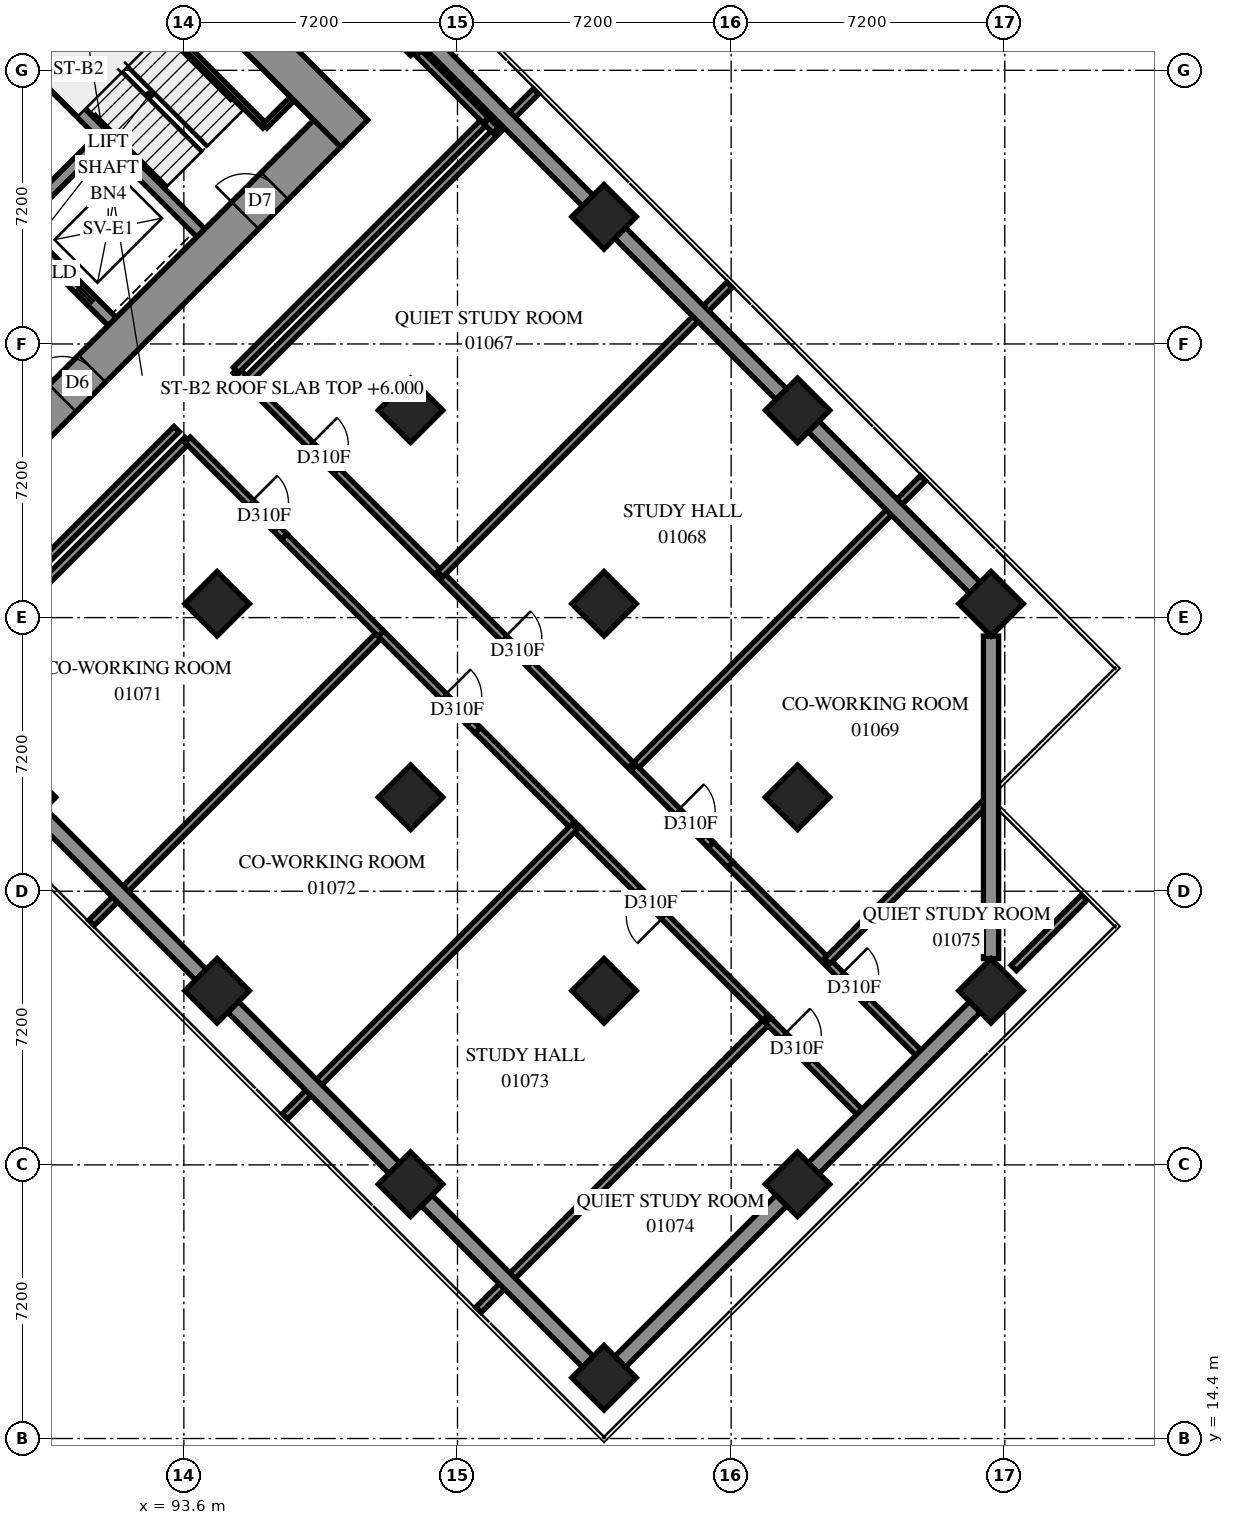
"""IFC4 building model, lengths in metres.
Left out: names, types, materials, properties, quantities, classifications, styles, units other than length and angle.
Written with IfcOpenShell. Run it as: python <this file> out.ifc"""

import sys

from ifc_helpers import new_model, si_unit, direction, frame, frame_2d, origin, origin_2d, place, context, subcontext, project, spatial, rectangle, extrude, element, fill, save


model = new_model("IFC4")
c1 = context("Model", 3, precision=1e-05, world=origin(), true_north=direction((0.0, 1.0)))
c2 = subcontext(c1, "Body", "Model", "MODEL_VIEW")
j1 = project(units=[si_unit("LENGTHUNIT", "METRE"), si_unit("PLANEANGLEUNIT", "RADIAN")], contexts=[c1])
p1 = place(None, origin())
s1 = spatial("IfcSite", under=j1, at=p1, CompositionType="ELEMENT")
p2 = place(p1, origin())
s2 = spatial("IfcBuilding", under=s1, at=p2, CompositionType="ELEMENT")
p3 = place(p2, frame((0.0, 0.0, 6.0)))
s3 = spatial("IfcBuildingStorey", under=s2, at=p3, CompositionType="ELEMENT", Elevation=6.0)
for number, where, z_axis, x_axis in (
    (1, (99.565, 51.635, 0.0), (0.0, 0.0, 1.0), (0.707, -0.707, 0.0)),
    (2, (104.656, 46.544, 0.0), (0.0, 0.0, 1.0), (0.707, -0.707, 0.0)),
    (3, (99.565, 41.453, 0.0), (0.0, 0.0, 1.0), (0.707, -0.707, 0.0)),
    (4, (94.474, 36.362, 0.0), (0.0, 0.0, 1.0), (0.707, -0.707, 0.0)),
    (5, (89.382, 31.271, 0.0), (0.0, 0.0, 1.0), (0.707, -0.707, 0.0)),
    (6, (109.747, 41.453, 0.0), (0.0, 0.0, 1.0), (0.707, -0.707, 0.0)),
    (7, (104.656, 36.362, 0.0), (0.0, 0.0, 1.0), (0.707, -0.707, 0.0)),
    (8, (99.565, 31.271, 0.0), (0.0, 0.0, 1.0), (0.707, -0.707, 0.0)),
    (9, (94.474, 26.18, 0.0), (0.0, 0.0, 1.0), (0.707, -0.707, 0.0)),
    (10, (114.838, 36.362, 0.0), (0.0, 0.0, 1.0), (0.707, -0.707, 0.0)),
    (11, (109.747, 31.271, 0.0), (0.0, 0.0, 1.0), (0.707, -0.707, 0.0)),
    (12, (104.656, 26.18, 0.0), (0.0, 0.0, 1.0), (0.707, -0.707, 0.0)),
    (13, (99.565, 21.088, 0.0), (0.0, 0.0, 1.0), (0.707, -0.707, 0.0)),
    (14, (114.838, 26.18, 0.0), (0.0, 0.0, 1.0), (0.707, -0.707, 0.0)),
    (15, (109.747, 21.088, 0.0), (0.0, 0.0, 1.0), (0.707, -0.707, 0.0)),
    (16, (104.656, 15.997, 0.0), (0.0, 0.0, 1.0), (0.707, -0.707, 0.0)),
):
    element("IfcColumn", number, at=place(p3, frame(where, z_axis=z_axis, x_axis=x_axis)), inside=s3, PredefinedType="COLUMN", context=c2, shape_type="SweptSolid", body=[
        extrude(rectangle(XDim=1.2, YDim=1.2, at=origin_2d()), origin(), (0.0, 0.0, 1.0), 3.8),
    ])
p4 = place(p3, frame((86.483, 60.333, -0.4), z_axis=(0.0, 0.0, 1.0), x_axis=(0.70710983, -0.7071037324, 0.0)))
e17 = element("IfcWall", 17, at=p4, inside=s3, PredefinedType="SHEAR", context=c2, shape_type="SweptSolid", body=[
    extrude(rectangle(XDim=16.4, YDim=1.0, at=frame_2d((8.2, 0.0))), origin(), (0.0, 0.0, 1.0), 3.5),
])
p5 = place(p4, frame((11.0, 0.0, 0.4)))
e18 = element("IfcOpeningElement", 18, at=p5, cuts=e17, PredefinedType="OPENING", context=c2, shape_type="SweptSolid", body=[
    extrude(rectangle(XDim=0.8, YDim=2.1, at=frame_2d((0.4, 1.05))), frame((0.0, 0.51, 0.0), z_axis=(0.0, -1.0, 0.0), x_axis=(1.0, 0.0, 0.0)), (0.0, 0.0, 1.0), 1.02),
])
p6 = place(p3, frame((87.19, 38.554, -0.4), z_axis=(0.0, 0.0, 1.0), x_axis=(0.707103309, 0.7071102534, 0.0)))
e19 = element("IfcWall", 19, at=p6, inside=s3, PredefinedType="SHEAR", context=c2, shape_type="SweptSolid", body=[
    extrude(rectangle(XDim=14.4, YDim=1.0, at=frame_2d((7.2, 0.0))), origin(), (0.0, 0.0, 1.0), 3.5),
])
p7 = place(p6, frame((4.55, 0.0, 0.4)))
e20 = element("IfcOpeningElement", 20, at=p7, cuts=e19, PredefinedType="OPENING", context=c2, shape_type="SweptSolid", body=[
    extrude(rectangle(XDim=1.1, YDim=2.1, at=frame_2d((0.55, 1.05))), frame((0.0, 0.51, 0.0), z_axis=(0.0, -1.0, 0.0), x_axis=(1.0, 0.0, 0.0)), (0.0, 0.0, 1.0), 1.02),
])
p8 = place(p6, frame((11.35, 0.0, 0.4)))
e21 = element("IfcOpeningElement", 21, at=p8, cuts=e19, PredefinedType="OPENING", context=c2, shape_type="SweptSolid", body=[
    extrude(rectangle(XDim=1.1, YDim=2.1, at=frame_2d((0.55, 1.05))), frame((0.0, 0.51, 0.0), z_axis=(0.0, -1.0, 0.0), x_axis=(1.0, 0.0, 0.0)), (0.0, 0.0, 1.0), 1.02),
])
p9 = place(p3, frame((89.17, 46.332, 0.0), z_axis=(0.0, 0.0, 1.0), x_axis=(0.7071067812, 0.7071067812, 0.0)))
e22 = element("IfcWall", 22, at=p9, inside=s3, PredefinedType="SOLIDWALL", context=c2, shape_type="SweptSolid", body=[
    extrude(rectangle(XDim=3.3, YDim=0.3, at=frame_2d((1.65, 0.0))), origin(), (0.0, 0.0, 1.0), 3.8),
])
p10 = place(p3, frame((81.534, 53.969, 0.0), z_axis=(0.0, 0.0, 1.0), x_axis=(0.707103309, -0.7071102534, 0.0)))
e23 = element("IfcWall", 23, at=p10, inside=s3, PredefinedType="SOLIDWALL", context=c2, shape_type="SweptSolid", body=[
    extrude(rectangle(XDim=14.4, YDim=0.3, at=frame_2d((7.2, 0.0))), origin(), (0.0, 0.0, 1.0), 3.8),
])
p11 = place(p10, frame((12.05, 0.0, 0.0)))
e24 = element("IfcOpeningElement", 24, at=p11, cuts=e23, PredefinedType="OPENING", context=c2, shape_type="SweptSolid", body=[
    extrude(rectangle(XDim=1.1, YDim=2.1, at=frame_2d((0.55, 1.05))), frame((0.0, 0.16, 0.0), z_axis=(0.0, -1.0, 0.0), x_axis=(1.0, 0.0, 0.0)), (0.0, 0.0, 1.0), 0.32),
])
p12 = place(p3, frame((88.958, 51.211, 0.0), z_axis=(0.0, 0.0, 1.0), x_axis=(0.7070998367, -0.7071137256, 0.0)))
e25 = element("IfcWall", 25, at=p12, inside=s3, PredefinedType="SOLIDWALL", context=c2, shape_type="SweptSolid", body=[
    extrude(rectangle(XDim=7.2, YDim=0.3, at=frame_2d((3.6, 0.0))), origin(), (0.0, 0.0, 1.0), 3.8),
])
p13 = place(p3, frame((91.313, 53.354, 0.0), z_axis=(0.0, 0.0, 1.0), x_axis=(0.7071147811, -0.7070987812, 0.0)))
e26 = element("IfcWall", 26, at=p13, inside=s3, PredefinedType="PARTITIONING", context=c2, shape_type="SweptSolid", body=[
    extrude(rectangle(XDim=6.25, YDim=0.15, at=frame_2d((3.125, 0.0))), origin(), (0.0, 0.0, 1.0), 3.8),
])
p14 = place(p3, frame((95.732, 48.934, 0.0), z_axis=(0.0, 0.0, 1.0), x_axis=(0.7071067812, 0.7071067812, 0.0)))
e27 = element("IfcWall", 27, at=p14, inside=s3, PredefinedType="PARTITIONING", context=c2, shape_type="SweptSolid", body=[
    extrude(rectangle(XDim=1.02, YDim=0.15, at=frame_2d((0.51, 0.0))), origin(), (0.0, 0.0, 1.0), 3.8),
])
p15 = place(p3, frame((94.967, 42.509, 0.0), z_axis=(0.0, 0.0, 1.0), x_axis=(0.7071067812, -0.7071067812, 0.0)))
e28 = element("IfcWall", 28, at=p15, inside=s3, PredefinedType="PARTITIONING", context=c2, shape_type="SweptSolid", body=[
    extrude(rectangle(XDim=14.798, YDim=0.2, at=frame_2d((7.399, 0.0))), origin(), (0.0, 0.0, 1.0), 3.8),
])
p16 = place(p15, frame((2.772, 0.0, 0.0)))
e29 = element("IfcOpeningElement", 29, at=p16, cuts=e28, PredefinedType="OPENING", context=c2, shape_type="SweptSolid", body=[
    extrude(rectangle(XDim=1.0, YDim=2.1, at=frame_2d((0.5, 1.05))), frame((0.0, 0.11, 0.0), z_axis=(0.0, -1.0, 0.0), x_axis=(1.0, 0.0, 0.0)), (0.0, 0.0, 1.0), 0.22),
])
p17 = place(p15, frame((9.972, 0.0, 0.0)))
e30 = element("IfcOpeningElement", 30, at=p17, cuts=e28, PredefinedType="OPENING", context=c2, shape_type="SweptSolid", body=[
    extrude(rectangle(XDim=1.0, YDim=2.1, at=frame_2d((0.5, 1.05))), frame((0.0, 0.11, 0.0), z_axis=(0.0, -1.0, 0.0), x_axis=(1.0, 0.0, 0.0)), (0.0, 0.0, 1.0), 0.22),
])
p18 = place(p3, frame((108.973, 25.405, 0.0), z_axis=(0.0, 0.0, 1.0), x_axis=(-0.7072456519, 0.7069678831, 0.0)))
e31 = element("IfcWall", 31, at=p18, inside=s3, PredefinedType="PARTITIONING", context=c2, shape_type="SweptSolid", body=[
    extrude(rectangle(XDim=10.8, YDim=0.2, at=frame_2d((5.4, 0.0))), origin(), (0.0, 0.0, 1.0), 3.8),
])
p19 = place(p18, frame((3.863, 0.0, 0.0)))
e32 = element("IfcOpeningElement", 32, at=p19, cuts=e31, PredefinedType="OPENING", context=c2, shape_type="SweptSolid", body=[
    extrude(rectangle(XDim=1.0, YDim=2.1, at=frame_2d((0.5, 1.05))), frame((0.0, 0.11, 0.0), z_axis=(0.0, -1.0, 0.0), x_axis=(1.0, 0.0, 0.0)), (0.0, 0.0, 1.0), 0.22),
])
for number, where, z_axis, x_axis in (
    (33, (100.342, 37.14, 0.0), (0.0, 0.0, 1.0), (0.707, 0.707, 0.0)),
    (34, (105.433, 32.049, 0.0), (0.0, 0.0, 1.0), (0.707, 0.707, 0.0)),
    (35, (86.079, 33.061, 0.0), (0.0, 0.0, 1.0), (0.707, 0.707, 0.0)),
    (36, (101.353, 17.787, 0.0), (0.0, 0.0, 1.0), (0.707, 0.707, 0.0)),
    (37, (96.261, 22.877, 0.0), (0.0, 0.0, 1.0), (0.707, 0.707, 0.0)),
    (38, (91.17, 27.968, 0.0), (0.0, 0.0, 1.0), (0.707, 0.707, 0.0)),
    (39, (95.25, 42.232, 0.0), (0.0, 0.0, 1.0), (0.707, 0.707, 0.0)),
):
    element("IfcWall", number, at=place(p3, frame(where, z_axis=z_axis, x_axis=x_axis)), inside=s3, PredefinedType="PARTITIONING", context=c2, shape_type="SweptSolid", body=[
        extrude(rectangle(XDim=10.771, YDim=0.2, at=frame_2d((5.385, 0.0))), origin(), (0.0, 0.0, 1.0), 3.8),
    ])
p20 = place(p3, frame((86.836, 34.382, 0.0), z_axis=(0.0, 0.0, 1.0), x_axis=(0.7071067812, 0.7071067812, 0.0)))
e40 = element("IfcWall", 40, at=p20, inside=s3, PredefinedType="PARTITIONING", context=c2, shape_type="SweptSolid", body=[
    extrude(rectangle(XDim=9.3, YDim=0.2, at=frame_2d((4.65, 0.0))), origin(), (0.0, 0.0, 1.0), 3.8),
])
p21 = place(p3, frame((94.972, 42.512, 0.0), z_axis=(0.0, 0.0, 1.0), x_axis=(0.7069992283, 0.7072143178, 0.0)))
e41 = element("IfcWall", 41, at=p21, inside=s3, PredefinedType="PARTITIONING", context=c2, shape_type="SweptSolid", body=[
    extrude(rectangle(XDim=9.299, YDim=0.2, at=frame_2d((4.649, 0.0))), origin(), (0.0, 0.0, 1.0), 3.8),
])
p22 = place(p3, frame((107.977, 29.499, 0.0), z_axis=(0.0, 0.0, 1.0), x_axis=(0.7071067812, -0.7071067812, 0.0)))
e42 = element("IfcWall", 42, at=p22, inside=s3, PredefinedType="PARTITIONING", context=c2, shape_type="SweptSolid", body=[
    extrude(rectangle(XDim=7.198, YDim=0.2, at=frame_2d((3.599, 0.0))), origin(), (0.0, 0.0, 1.0), 3.8),
])
p23 = place(p22, frame((4.106, 0.0, 0.0)))
e43 = element("IfcOpeningElement", 43, at=p23, cuts=e42, PredefinedType="OPENING", context=c2, shape_type="SweptSolid", body=[
    extrude(rectangle(XDim=1.0, YDim=2.1, at=frame_2d((0.5, 1.05))), frame((0.0, 0.11, 0.0), z_axis=(0.0, -1.0, 0.0), x_axis=(1.0, 0.0, 0.0)), (0.0, 0.0, 1.0), 0.22),
])
p24 = place(p3, frame((110.524, 26.958, 0.0), z_axis=(0.0, 0.0, 1.0), x_axis=(0.7071067812, 0.7071067812, 0.0)))
e44 = element("IfcWall", 44, at=p24, inside=s3, PredefinedType="PARTITIONING", context=c2, shape_type="SweptSolid", body=[
    extrude(rectangle(XDim=5.971, YDim=0.2, at=frame_2d((2.985, 0.0))), origin(), (0.0, 0.0, 1.0), 3.8),
])
p25 = place(p3, frame((105.255, 16.599, 0.0), z_axis=(0.0, 0.0, 1.0), x_axis=(0.7071067812, 0.7071067812, 0.0)))
e45 = element("IfcWall", 45, at=p25, inside=s3, PredefinedType="PARTITIONING", context=c2, shape_type="SweptSolid", body=[
    extrude(rectangle(XDim=5.504, YDim=0.2, at=frame_2d((2.752, 0.0))), origin(), (0.0, 0.0, 1.0), 3.2),
])
p26 = place(p3, frame((93.699, 40.679, 0.0), z_axis=(0.0, 0.0, 1.0), x_axis=(0.7071067812, -0.7071067812, 0.0)))
e46 = element("IfcWall", 46, at=p26, inside=s3, PredefinedType="PARTITIONING", context=c2, shape_type="SweptSolid", body=[
    extrude(rectangle(XDim=3.601, YDim=0.2, at=frame_2d((1.8, 0.0))), origin(), (0.0, 0.0, 1.0), 3.8),
])
p27 = place(p26, frame((2.338, 0.0, 0.0)))
e47 = element("IfcOpeningElement", 47, at=p27, cuts=e46, PredefinedType="OPENING", context=c2, shape_type="SweptSolid", body=[
    extrude(rectangle(XDim=1.0, YDim=2.1, at=frame_2d((0.5, 1.05))), frame((0.0, 0.11, 0.0), z_axis=(0.0, -1.0, 0.0), x_axis=(1.0, 0.0, 0.0)), (0.0, 0.0, 1.0), 0.22),
])
p28 = place(p3, frame((98.783, 35.581, 0.0), z_axis=(0.0, 0.0, 1.0), x_axis=(0.7071067812, -0.7071067812, 0.0)))
e48 = element("IfcWall", 48, at=p28, inside=s3, PredefinedType="PARTITIONING", context=c2, shape_type="SweptSolid", body=[
    extrude(rectangle(XDim=3.601, YDim=0.2, at=frame_2d((1.8, 0.0))), origin(), (0.0, 0.0, 1.0), 3.8),
])
p29 = place(p28, frame((2.338, 0.0, 0.0)))
e49 = element("IfcOpeningElement", 49, at=p29, cuts=e48, PredefinedType="OPENING", context=c2, shape_type="SweptSolid", body=[
    extrude(rectangle(XDim=1.0, YDim=2.1, at=frame_2d((0.5, 1.05))), frame((0.0, 0.11, 0.0), z_axis=(0.0, -1.0, 0.0), x_axis=(1.0, 0.0, 0.0)), (0.0, 0.0, 1.0), 0.22),
])
p30 = place(p3, frame((108.971, 25.403, 0.0), z_axis=(0.0, 0.0, 1.0), x_axis=(0.7068288851, -0.7073845681, 0.0)))
e50 = element("IfcWall", 50, at=p30, inside=s3, PredefinedType="PARTITIONING", context=c2, shape_type="SweptSolid", body=[
    extrude(rectangle(XDim=3.599, YDim=0.2, at=frame_2d((1.8, 0.0))), origin(), (0.0, 0.0, 1.0), 3.8),
])
p31 = place(p30, frame((0.567, 0.0, 0.0)))
e51 = element("IfcOpeningElement", 51, at=p31, cuts=e50, PredefinedType="OPENING", context=c2, shape_type="SweptSolid", body=[
    extrude(rectangle(XDim=1.0, YDim=2.1, at=frame_2d((0.5, 1.05))), frame((0.0, 0.11, 0.0), z_axis=(0.0, -1.0, 0.0), x_axis=(1.0, 0.0, 0.0)), (0.0, 0.0, 1.0), 0.22),
])
p32 = place(p3, frame((96.241, 38.129, 0.0), z_axis=(0.0, 0.0, 1.0), x_axis=(0.7068288851, -0.7073845681, 0.0)))
e52 = element("IfcWall", 52, at=p32, inside=s3, PredefinedType="PARTITIONING", context=c2, shape_type="SweptSolid", body=[
    extrude(rectangle(XDim=3.599, YDim=0.2, at=frame_2d((1.8, 0.0))), origin(), (0.0, 0.0, 1.0), 3.8),
])
p33 = place(p3, frame((105.435, 32.049, 0.0), z_axis=(0.0, 0.0, 1.0), x_axis=(0.7074545101, -0.7067588812, 0.0)))
e53 = element("IfcWall", 53, at=p33, inside=s3, PredefinedType="PARTITIONING", context=c2, shape_type="SweptSolid", body=[
    extrude(rectangle(XDim=2.875, YDim=0.2, at=frame_2d((1.438, 0.0))), origin(), (0.0, 0.0, 1.0), 3.8),
])
p34 = place(p33, frame((1.617, 0.0, 0.0)))
e54 = element("IfcOpeningElement", 54, at=p34, cuts=e53, PredefinedType="OPENING", context=c2, shape_type="SweptSolid", body=[
    extrude(rectangle(XDim=1.0, YDim=2.1, at=frame_2d((0.5, 1.05))), frame((0.0, 0.11, 0.0), z_axis=(0.0, -1.0, 0.0), x_axis=(1.0, 0.0, 0.0)), (0.0, 0.0, 1.0), 0.22),
])
p35 = place(p3, frame((115.438, 26.78, 0.0), z_axis=(0.0, 0.0, 1.0), x_axis=(0.7071067812, 0.7071067812, 0.0)))
e55 = element("IfcWall", 55, at=p35, inside=s3, PredefinedType="PARTITIONING", context=c2, shape_type="SweptSolid", body=[
    extrude(rectangle(XDim=2.622, YDim=0.2, at=frame_2d((1.311, 0.0))), origin(), (0.0, 0.0, 1.0), 3.8),
])
p36 = place(p3, frame((99.777, 50.851, 0.0), z_axis=(0.0, 0.0, 1.0), x_axis=(0.7071067812, -0.7071067812, 0.0)))
e56 = element("IfcWall", 56, at=p36, inside=s3, PredefinedType="PARTITIONING", context=c2, shape_type="SweptSolid", body=[
    extrude(rectangle(XDim=2.495, YDim=0.2, at=frame_2d((1.247, 0.0))), origin(), (0.0, 0.0, 1.0), 3.8),
])
p37 = place(p3, frame((111.513, 22.857, 0.0), z_axis=(0.0, 0.0, 1.0), x_axis=(0.7071067812, 0.7071067812, 0.0)))
e57 = element("IfcWall", 57, at=p37, inside=s3, PredefinedType="PARTITIONING", context=c2, shape_type="SweptSolid", body=[
    extrude(rectangle(XDim=2.2, YDim=0.2, at=frame_2d((1.1, 0.0))), origin(), (0.0, 0.0, 1.0), 3.2),
])
for number, where, z_axis, x_axis in (
    (58, (110.346, 21.689, 0.0), (0.0, 0.0, 1.0), (0.707, 0.707, 0.0)),
    (59, (113.07, 24.413, 0.0), (0.0, 0.0, 1.0), (0.707, 0.707, 0.0)),
):
    element("IfcWall", number, at=place(p3, frame(where, z_axis=z_axis, x_axis=x_axis)), inside=s3, PredefinedType="PARTITIONING", context=c2, shape_type="SweptSolid", body=[
        extrude(rectangle(XDim=1.652, YDim=0.2, at=frame_2d((0.826, 0.0))), origin(), (0.0, 0.0, 1.0), 3.2),
    ])
p38 = place(p3, frame((107.466, 30.014, 0.0), z_axis=(0.0, 0.0, 1.0), x_axis=(0.7057270646, -0.7084838109, 0.0)))
e60 = element("IfcWall", 60, at=p38, inside=s3, PredefinedType="PARTITIONING", context=c2, shape_type="SweptSolid", body=[
    extrude(rectangle(XDim=0.726, YDim=0.2, at=frame_2d((0.363, 0.0))), origin(), (0.0, 0.0, 1.0), 3.8),
])
p39 = place(p3, frame((101.562, 49.066, 0.0), z_axis=(0.0, 0.0, 1.0), x_axis=(0.7071067812, -0.7071067812, 0.0)))
e61 = element("IfcWall", 61, at=p39, inside=s3, PredefinedType="PARTITIONING", context=c2, shape_type="SweptSolid", body=[
    extrude(rectangle(XDim=0.342, YDim=0.2, at=frame_2d((0.171, 0.0))), origin(), (0.0, 0.0, 1.0), 3.8),
])
p40 = place(p7, origin())
e62 = element("IfcDoor", 62, at=p40, inside=s3, OperationType="DOUBLE_DOOR_SINGLE_SWING", PredefinedType="DOOR", context=c2, shape_type="SweptSolid", body=[
    extrude(rectangle(XDim=1.1, YDim=2.1, at=frame_2d((0.55, 1.05))), frame((0.0, 0.025, 0.0), z_axis=(0.0, -1.0, 0.0), x_axis=(1.0, 0.0, 0.0)), (0.0, 0.0, 1.0), 0.05),
])
fill(e20, e62)
p41 = place(p8, origin())
e63 = element("IfcDoor", 63, at=p41, inside=s3, OperationType="SINGLE_SWING_RIGHT", PredefinedType="DOOR", context=c2, shape_type="SweptSolid", body=[
    extrude(rectangle(XDim=1.1, YDim=2.1, at=frame_2d((0.55, 1.05))), frame((0.0, 0.025, 0.0), z_axis=(0.0, -1.0, 0.0), x_axis=(1.0, 0.0, 0.0)), (0.0, 0.0, 1.0), 0.05),
])
fill(e21, e63)
p42 = place(p11, origin())
e64 = element("IfcDoor", 64, at=p42, inside=s3, OperationType="SLIDING_TO_RIGHT", PredefinedType="DOOR", context=c2, shape_type="SweptSolid", body=[
    extrude(rectangle(XDim=1.1, YDim=2.1, at=frame_2d((0.55, 1.05))), frame((0.0, 0.025, 0.0), z_axis=(0.0, -1.0, 0.0), x_axis=(1.0, 0.0, 0.0)), (0.0, 0.0, 1.0), 0.05),
])
fill(e24, e64)
p43 = place(p16, origin())
e65 = element("IfcDoor", 65, at=p43, inside=s3, OperationType="SINGLE_SWING_RIGHT", PredefinedType="DOOR", context=c2, shape_type="SweptSolid", body=[
    extrude(rectangle(XDim=1.0, YDim=2.1, at=frame_2d((0.5, 1.05))), frame((0.0, 0.025, 0.0), z_axis=(0.0, -1.0, 0.0), x_axis=(1.0, 0.0, 0.0)), (0.0, 0.0, 1.0), 0.05),
])
fill(e29, e65)
p44 = place(p17, origin())
e66 = element("IfcDoor", 66, at=p44, inside=s3, OperationType="SINGLE_SWING_RIGHT", PredefinedType="DOOR", context=c2, shape_type="SweptSolid", body=[
    extrude(rectangle(XDim=1.0, YDim=2.1, at=frame_2d((0.5, 1.05))), frame((0.0, 0.025, 0.0), z_axis=(0.0, -1.0, 0.0), x_axis=(1.0, 0.0, 0.0)), (0.0, 0.0, 1.0), 0.05),
])
fill(e30, e66)
p45 = place(p34, origin())
e67 = element("IfcDoor", 67, at=p45, inside=s3, OperationType="SINGLE_SWING_RIGHT", PredefinedType="DOOR", context=c2, shape_type="SweptSolid", body=[
    extrude(rectangle(XDim=1.0, YDim=2.1, at=frame_2d((0.5, 1.05))), frame((0.0, 0.025, 0.0), z_axis=(0.0, -1.0, 0.0), x_axis=(1.0, 0.0, 0.0)), (0.0, 0.0, 1.0), 0.05),
])
fill(e54, e67)
p46 = place(p27, origin())
e68 = element("IfcDoor", 68, at=p46, inside=s3, OperationType="SINGLE_SWING_LEFT", PredefinedType="DOOR", context=c2, shape_type="SweptSolid", body=[
    extrude(rectangle(XDim=1.0, YDim=2.1, at=frame_2d((0.5, 1.05))), frame((0.0, 0.025, 0.0), z_axis=(0.0, -1.0, 0.0), x_axis=(1.0, 0.0, 0.0)), (0.0, 0.0, 1.0), 0.05),
])
fill(e47, e68)
p47 = place(p29, origin())
e69 = element("IfcDoor", 69, at=p47, inside=s3, OperationType="SINGLE_SWING_LEFT", PredefinedType="DOOR", context=c2, shape_type="SweptSolid", body=[
    extrude(rectangle(XDim=1.0, YDim=2.1, at=frame_2d((0.5, 1.05))), frame((0.0, 0.025, 0.0), z_axis=(0.0, -1.0, 0.0), x_axis=(1.0, 0.0, 0.0)), (0.0, 0.0, 1.0), 0.05),
])
fill(e49, e69)
p48 = place(p19, origin())
e70 = element("IfcDoor", 70, at=p48, inside=s3, OperationType="SINGLE_SWING_LEFT", PredefinedType="DOOR", context=c2, shape_type="SweptSolid", body=[
    extrude(rectangle(XDim=1.0, YDim=2.1, at=frame_2d((0.5, 1.05))), frame((0.0, 0.025, 0.0), z_axis=(0.0, -1.0, 0.0), x_axis=(1.0, 0.0, 0.0)), (0.0, 0.0, 1.0), 0.05),
])
fill(e32, e70)
p49 = place(p31, origin())
e71 = element("IfcDoor", 71, at=p49, inside=s3, OperationType="SINGLE_SWING_LEFT", PredefinedType="DOOR", context=c2, shape_type="SweptSolid", body=[
    extrude(rectangle(XDim=1.0, YDim=2.1, at=frame_2d((0.5, 1.05))), frame((0.0, 0.025, 0.0), z_axis=(0.0, -1.0, 0.0), x_axis=(1.0, 0.0, 0.0)), (0.0, 0.0, 1.0), 0.05),
])
fill(e51, e71)
p50 = place(p23, origin())
e72 = element("IfcDoor", 72, at=p50, inside=s3, OperationType="SINGLE_SWING_RIGHT", PredefinedType="DOOR", context=c2, shape_type="SweptSolid", body=[
    extrude(rectangle(XDim=1.0, YDim=2.1, at=frame_2d((0.5, 1.05))), frame((0.0, 0.025, 0.0), z_axis=(0.0, -1.0, 0.0), x_axis=(1.0, 0.0, 0.0)), (0.0, 0.0, 1.0), 0.05),
])
fill(e43, e72)
save(model, sys.argv[1])
